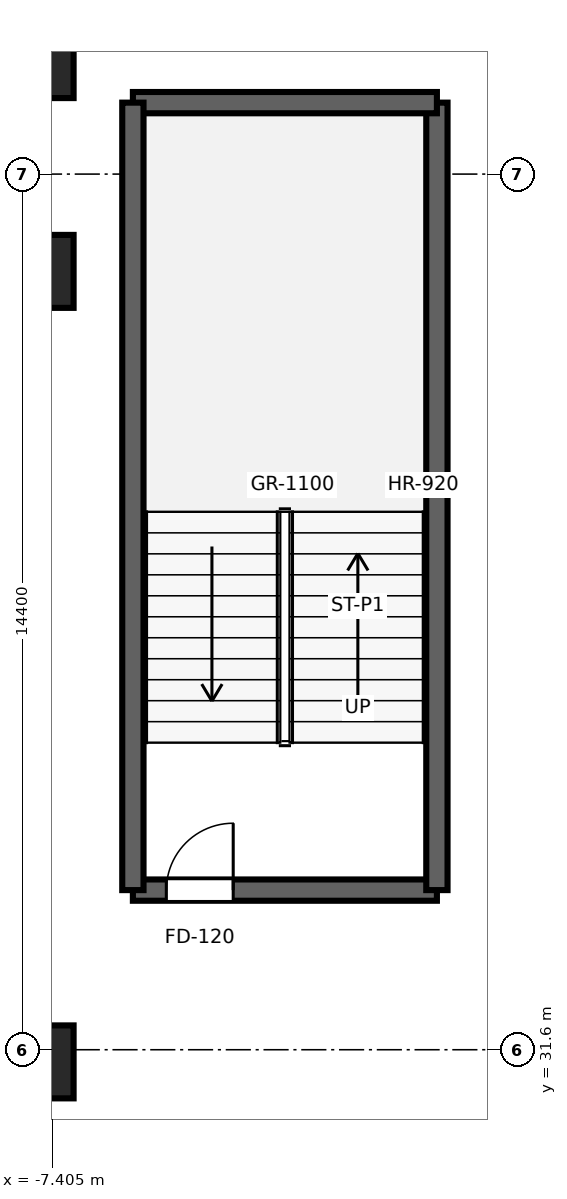
"""IFC4 building model, lengths in metres.
Left out: names, types, materials, properties, quantities, classifications, styles, units other than length and angle.
Written with IfcOpenShell. Run it as: python <this file> out.ifc"""

import sys

from ifc_helpers import new_model, si_unit, direction, frame, frame_2d, origin, origin_2d, place, context, subcontext, project, spatial, rectangle, extrude, source, transform, mapped, element, fill, save


model = new_model("IFC4")
c1 = context("Model", 3, precision=1e-05, world=origin(), true_north=direction((0.0, 1.0)))
c2 = subcontext(c1, "Body", "Model", "MODEL_VIEW")
j1 = project(units=[si_unit("LENGTHUNIT", "METRE"), si_unit("PLANEANGLEUNIT", "RADIAN")], contexts=[c1])
p1 = place(None, origin())
s1 = spatial("IfcSite", under=j1, at=p1, CompositionType="ELEMENT")
p2 = place(p1, origin())
s2 = spatial("IfcBuilding", under=s1, at=p2, CompositionType="ELEMENT")
p3 = place(p2, frame((0.0, 0.0, 22.4)))
s3 = spatial("IfcBuildingStorey", under=s2, at=p3, CompositionType="ELEMENT", Elevation=22.4)
p4 = place(p3, frame((-6.075, 34.225, 0.0), z_axis=(0.0, 0.0, 1.0), x_axis=(1.0, 0.0, 0.0)))
e1 = element("IfcWall", 1, at=p4, inside=s3, PredefinedType="SHEAR", context=c2, shape_type="SweptSolid", body=[
    extrude(rectangle(XDim=5.0, YDim=0.35, at=frame_2d((2.5, 0.0))), origin(), (0.0, 0.0, 1.0), 4.4),
])
p5 = place(p4, frame((0.55, 0.0, 0.0)))
e2 = element("IfcOpeningElement", 2, at=p5, cuts=e1, PredefinedType="OPENING", context=c2, shape_type="SweptSolid", body=[
    extrude(rectangle(XDim=1.1, YDim=2.12, at=frame_2d((0.55, 1.06))), frame((0.0, 0.185, 0.0), z_axis=(0.0, -1.0, 0.0), x_axis=(1.0, 0.0, 0.0)), (0.0, 0.0, 1.0), 0.37),
])
p6 = place(p3, frame((-1.075, 34.225, 0.0), z_axis=(0.0, 0.0, 1.0), x_axis=(0.0, 1.0, 0.0)))
e3 = element("IfcWall", 3, at=p6, inside=s3, PredefinedType="SHEAR", context=c2, shape_type="SweptSolid", body=[
    extrude(rectangle(XDim=12.95, YDim=0.35, at=frame_2d((6.475, 0.0))), origin(), (0.0, 0.0, 1.0), 4.4),
])
p7 = place(p3, frame((-1.075, 47.175, 0.0), z_axis=(0.0, 0.0, 1.0), x_axis=(-1.0, 0.0, 0.0)))
e4 = element("IfcWall", 4, at=p7, inside=s3, PredefinedType="SHEAR", context=c2, shape_type="SweptSolid", body=[
    extrude(rectangle(XDim=5.0, YDim=0.35, at=frame_2d((2.5, 0.0))), origin(), (0.0, 0.0, 1.0), 4.4),
])
p8 = place(p3, frame((-6.075, 47.175, 0.0), z_axis=(0.0, 0.0, 1.0), x_axis=(0.0, -1.0, 0.0)))
e5 = element("IfcWall", 5, at=p8, inside=s3, PredefinedType="SHEAR", context=c2, shape_type="SweptSolid", body=[
    extrude(rectangle(XDim=12.95, YDim=0.35, at=frame_2d((6.475, 0.0))), origin(), (0.0, 0.0, 1.0), 4.4),
])
m1 = source(origin(), c2, "Body", "SweptSolid", [
    extrude(rectangle(XDim=1.2, YDim=1.2, at=origin_2d()), origin(), (0.0, 0.0, 1.0), 4.4),
])
for number, where, z_axis, x_axis in (
    (6, (-7.65, 31.4, 0.0), (0.0, 0.0, 1.0), (1.0, 0.0, 0.0)),
    (7, (-7.65, 44.4, 0.0), (0.0, 0.0, 1.0), (1.0, 0.0, 0.0)),
    (8, (-7.65, 47.85, 0.0), (0.0, 0.0, 1.0), (1.0, 0.0, 0.0)),
):
    element("IfcColumn", number, at=place(p3, frame(where, z_axis=z_axis, x_axis=x_axis)), inside=s3, PredefinedType="COLUMN", context=c2, shape_type="MappedRepresentation", body=[
        mapped(m1, transform((0.0, 0.0, 0.0), x_axis=(1.0, 0.0, 0.0), y_axis=(0.0, 1.0, 0.0), z_axis=(0.0, 0.0, 1.0), scale=1.0)),
    ])
m2 = source(origin(), c2, "Body", "SweptSolid", [
    extrude(rectangle(XDim=1.1, YDim=2.12, at=frame_2d((0.55, 1.06))), frame((0.0, 0.025, 0.0), z_axis=(0.0, -1.0, 0.0), x_axis=(1.0, 0.0, 0.0)), (0.0, 0.0, 1.0), 0.05),
])
p9 = place(p5, origin())
e9 = element("IfcDoor", 9, at=p9, inside=s3, OperationType="SINGLE_SWING_RIGHT", PredefinedType="DOOR", context=c2, shape_type="MappedRepresentation", body=[
    mapped(m2, transform((0.0, 0.0, 0.0), x_axis=(1.0, 0.0, 0.0), y_axis=(0.0, 1.0, 0.0), z_axis=(0.0, 0.0, 1.0), scale=1.0)),
])
fill(e2, e9)
save(model, sys.argv[1])
